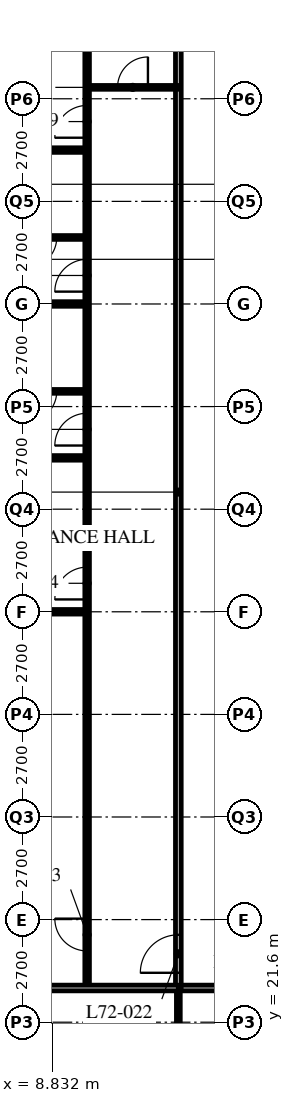
"""IFC4 building model, lengths in metres.
Left out: names, types, materials, properties, quantities, classifications, styles, units other than length and angle.
Written with IfcOpenShell. Run it as: python <this file> out.ifc"""

import sys

from ifc_helpers import new_model, si_unit, direction, frame, frame_2d, origin, place, context, subcontext, project, spatial, rectangle, extrude, element, fill, save


model = new_model("IFC4")
c1 = context("Model", 3, precision=1e-05, world=origin(), true_north=direction((0.0, 1.0)))
c2 = subcontext(c1, "Body", "Model", "MODEL_VIEW")
j1 = project(units=[si_unit("LENGTHUNIT", "METRE"), si_unit("PLANEANGLEUNIT", "RADIAN")], contexts=[c1])
p1 = place(None, origin())
s1 = spatial("IfcSite", under=j1, at=p1, CompositionType="ELEMENT")
p2 = place(p1, origin())
s2 = spatial("IfcBuilding", under=s1, at=p2, CompositionType="ELEMENT")
p3 = place(p2, frame((0.0, 0.0, 281.4)))
s3 = spatial("IfcBuildingStorey", under=s2, at=p3, CompositionType="ELEMENT", Elevation=281.4)
p4 = place(p3, frame((12.15, 22.5, 0.0), z_axis=(0.0, 0.0, 1.0), x_axis=(1.0, 0.0, 0.0)))
e1 = element("IfcWall", 1, at=p4, inside=s3, PredefinedType="PARTITIONING", context=c2, shape_type="SweptSolid", body=[
    extrude(rectangle(XDim=24.3, YDim=0.15, at=frame_2d((12.15, 0.0))), origin(), (0.0, 0.0, 1.0), 3.69),
])
p5 = place(p4, frame((4.45, 0.0, 0.0)))
e2 = element("IfcOpeningElement", 2, at=p5, cuts=e1, PredefinedType="OPENING", context=c2, shape_type="SweptSolid", body=[
    extrude(rectangle(XDim=1.0, YDim=2.1, at=frame_2d((0.5, 1.05))), frame((0.0, 0.085, 0.0), z_axis=(0.0, -1.0, 0.0), x_axis=(1.0, 0.0, 0.0)), (0.0, 0.0, 1.0), 0.17),
])
p6 = place(p4, frame((22.6, 0.0, 0.0)))
e3 = element("IfcOpeningElement", 3, at=p6, cuts=e1, PredefinedType="OPENING", context=c2, shape_type="SweptSolid", body=[
    extrude(rectangle(XDim=1.0, YDim=2.1, at=frame_2d((0.5, 1.05))), frame((0.0, 0.085, 0.0), z_axis=(0.0, -1.0, 0.0), x_axis=(1.0, 0.0, 0.0)), (0.0, 0.0, 1.0), 0.17),
])
p7 = place(p4, frame((2.625, 0.0, 0.0)))
e4 = element("IfcOpeningElement", 4, at=p7, cuts=e1, PredefinedType="OPENING", context=c2, shape_type="SweptSolid", body=[
    extrude(rectangle(XDim=1.0, YDim=2.1, at=frame_2d((0.5, 1.05))), frame((0.0, 0.085, 0.0), z_axis=(0.0, -1.0, 0.0), x_axis=(1.0, 0.0, 0.0)), (0.0, 0.0, 1.0), 0.17),
])
p8 = place(p3, frame((12.15, 22.5, 0.0), z_axis=(0.0, 0.0, 1.0), x_axis=(0.0, 1.0, 0.0)))
e5 = element("IfcWall", 5, at=p8, inside=s3, PredefinedType="PARTITIONING", context=c2, shape_type="SweptSolid", body=[
    extrude(rectangle(XDim=26.1, YDim=0.15, at=frame_2d((13.05, 0.0))), origin(), (0.0, 0.0, 1.0), 3.69),
])
p9 = place(p8, frame((0.4, 0.0, 0.0)))
e6 = element("IfcOpeningElement", 6, at=p9, cuts=e5, PredefinedType="OPENING", context=c2, shape_type="SweptSolid", body=[
    extrude(rectangle(XDim=1.0, YDim=2.1, at=frame_2d((0.5, 1.05))), frame((0.0, 0.085, 0.0), z_axis=(0.0, -1.0, 0.0), x_axis=(1.0, 0.0, 0.0)), (0.0, 0.0, 1.0), 0.17),
])
p10 = place(p3, frame((9.75, 22.5, 0.0), z_axis=(0.0, 0.0, 1.0), x_axis=(0.0, 1.0, 0.0)))
e7 = element("IfcWall", 7, at=p10, inside=s3, PredefinedType="PARTITIONING", context=c2, shape_type="SweptSolid", body=[
    extrude(rectangle(XDim=26.1, YDim=0.12, at=frame_2d((13.05, 0.0))), origin(), (0.0, 0.0, 1.0), 3.69),
])
p11 = place(p10, frame((0.975, 0.0, 0.0)))
e8 = element("IfcOpeningElement", 8, at=p11, cuts=e7, PredefinedType="OPENING", context=c2, shape_type="SweptSolid", body=[
    extrude(rectangle(XDim=0.85, YDim=2.1, at=frame_2d((0.425, 1.05))), frame((0.0, 0.07, 0.0), z_axis=(0.0, -1.0, 0.0), x_axis=(1.0, 0.0, 0.0)), (0.0, 0.0, 1.0), 0.14),
])
p12 = place(p10, frame((10.225, 0.0, 0.0)))
e9 = element("IfcOpeningElement", 9, at=p12, cuts=e7, PredefinedType="OPENING", context=c2, shape_type="SweptSolid", body=[
    extrude(rectangle(XDim=0.85, YDim=2.1, at=frame_2d((0.425, 1.05))), frame((0.0, 0.07, 0.0), z_axis=(0.0, -1.0, 0.0), x_axis=(1.0, 0.0, 0.0)), (0.0, 0.0, 1.0), 0.14),
])
p13 = place(p10, frame((14.275, 0.0, 0.0)))
e10 = element("IfcOpeningElement", 10, at=p13, cuts=e7, PredefinedType="OPENING", context=c2, shape_type="SweptSolid", body=[
    extrude(rectangle(XDim=0.85, YDim=2.1, at=frame_2d((0.425, 1.05))), frame((0.0, 0.07, 0.0), z_axis=(0.0, -1.0, 0.0), x_axis=(1.0, 0.0, 0.0)), (0.0, 0.0, 1.0), 0.14),
])
p14 = place(p10, frame((18.325, 0.0, 0.0)))
e11 = element("IfcOpeningElement", 11, at=p14, cuts=e7, PredefinedType="OPENING", context=c2, shape_type="SweptSolid", body=[
    extrude(rectangle(XDim=0.85, YDim=2.1, at=frame_2d((0.425, 1.05))), frame((0.0, 0.07, 0.0), z_axis=(0.0, -1.0, 0.0), x_axis=(1.0, 0.0, 0.0)), (0.0, 0.0, 1.0), 0.14),
])
p15 = place(p10, frame((22.375, 0.0, 0.0)))
e12 = element("IfcOpeningElement", 12, at=p15, cuts=e7, PredefinedType="OPENING", context=c2, shape_type="SweptSolid", body=[
    extrude(rectangle(XDim=0.85, YDim=2.1, at=frame_2d((0.425, 1.05))), frame((0.0, 0.07, 0.0), z_axis=(0.0, -1.0, 0.0), x_axis=(1.0, 0.0, 0.0)), (0.0, 0.0, 1.0), 0.14),
])
p16 = place(p3, frame((12.15, 46.2, 0.0), z_axis=(0.0, 0.0, 1.0), x_axis=(-1.0, 0.0, 0.0)))
e13 = element("IfcWall", 13, at=p16, inside=s3, PredefinedType="PARTITIONING", context=c2, shape_type="SweptSolid", body=[
    extrude(rectangle(XDim=2.4, YDim=0.1, at=frame_2d((1.2, 0.0))), origin(), (0.0, 0.0, 1.0), 3.69),
])
p17 = place(p16, frame((0.8, 0.0, 0.0)))
e14 = element("IfcOpeningElement", 14, at=p17, cuts=e13, PredefinedType="OPENING", context=c2, shape_type="SweptSolid", body=[
    extrude(rectangle(XDim=0.8, YDim=2.1, at=frame_2d((0.4, 1.05))), frame((0.0, 0.06, 0.0), z_axis=(0.0, -1.0, 0.0), x_axis=(1.0, 0.0, 0.0)), (0.0, 0.0, 1.0), 0.12),
])
p18 = place(p3, frame((9.75, 32.4, 0.0), z_axis=(0.0, 0.0, 1.0), x_axis=(-1.0, 0.0, 0.0)))
e15 = element("IfcWall", 15, at=p18, inside=s3, PredefinedType="PARTITIONING", context=c2, shape_type="SweptSolid", body=[
    extrude(rectangle(XDim=9.45, YDim=0.12, at=frame_2d((4.725, 0.0))), origin(), (0.0, 0.0, 1.0), 3.078),
])
p19 = place(p3, frame((9.75, 38.2, 0.0), z_axis=(0.0, 0.0, 1.0), x_axis=(-1.0, 0.0, 0.0)))
e16 = element("IfcWall", 16, at=p19, inside=s3, PredefinedType="PARTITIONING", context=c2, shape_type="SweptSolid", body=[
    extrude(rectangle(XDim=2.4, YDim=0.1, at=frame_2d((1.2, 0.0))), origin(), (0.0, 0.0, 1.0), 3.69),
])
p20 = place(p19, frame((0.8, 0.0, 0.0)))
e17 = element("IfcOpeningElement", 17, at=p20, cuts=e16, PredefinedType="OPENING", context=c2, shape_type="SweptSolid", body=[
    extrude(rectangle(XDim=0.8, YDim=2.1, at=frame_2d((0.4, 1.05))), frame((0.0, 0.06, 0.0), z_axis=(0.0, -1.0, 0.0), x_axis=(1.0, 0.0, 0.0)), (0.0, 0.0, 1.0), 0.12),
])
p21 = place(p3, frame((9.75, 36.45, 0.0), z_axis=(0.0, 0.0, 1.0), x_axis=(-1.0, 0.0, 0.0)))
e18 = element("IfcWall", 18, at=p21, inside=s3, PredefinedType="PARTITIONING", context=c2, shape_type="SweptSolid", body=[
    extrude(rectangle(XDim=9.45, YDim=0.12, at=frame_2d((4.725, 0.0))), origin(), (0.0, 0.0, 1.0), 3.69),
])
p22 = place(p3, frame((9.75, 42.25, 0.0), z_axis=(0.0, 0.0, 1.0), x_axis=(-1.0, 0.0, 0.0)))
e19 = element("IfcWall", 19, at=p22, inside=s3, PredefinedType="PARTITIONING", context=c2, shape_type="SweptSolid", body=[
    extrude(rectangle(XDim=2.4, YDim=0.1, at=frame_2d((1.2, 0.0))), origin(), (0.0, 0.0, 1.0), 3.69),
])
p23 = place(p22, frame((0.8, 0.0, 0.0)))
e20 = element("IfcOpeningElement", 20, at=p23, cuts=e19, PredefinedType="OPENING", context=c2, shape_type="SweptSolid", body=[
    extrude(rectangle(XDim=0.8, YDim=2.1, at=frame_2d((0.4, 1.05))), frame((0.0, 0.06, 0.0), z_axis=(0.0, -1.0, 0.0), x_axis=(1.0, 0.0, 0.0)), (0.0, 0.0, 1.0), 0.12),
])
p24 = place(p3, frame((9.75, 40.5, 0.0), z_axis=(0.0, 0.0, 1.0), x_axis=(-1.0, 0.0, 0.0)))
e21 = element("IfcWall", 21, at=p24, inside=s3, PredefinedType="PARTITIONING", context=c2, shape_type="SweptSolid", body=[
    extrude(rectangle(XDim=9.45, YDim=0.12, at=frame_2d((4.725, 0.0))), origin(), (0.0, 0.0, 1.0), 3.078),
])
p25 = place(p3, frame((9.75, 44.55, 0.0), z_axis=(0.0, 0.0, 1.0), x_axis=(-1.0, 0.0, 0.0)))
e22 = element("IfcWall", 22, at=p25, inside=s3, PredefinedType="PARTITIONING", context=c2, shape_type="SweptSolid", body=[
    extrude(rectangle(XDim=9.45, YDim=0.12, at=frame_2d((4.725, 0.0))), origin(), (0.0, 0.0, 1.0), 3.69),
])
p26 = place(p3, frame((12.15, 22.5, 0.0), z_axis=(0.0, 0.0, 1.0), x_axis=(0.0, -1.0, 0.0)))
e23 = element("IfcWall", 23, at=p26, inside=s3, PredefinedType="PARTITIONING", context=c2, shape_type="SweptSolid", body=[
    extrude(rectangle(XDim=2.4, YDim=0.1, at=frame_2d((1.2, 0.0))), origin(), (0.0, 0.0, 1.0), 3.69),
])
p27 = place(p3, frame((4.35, 22.5, 0.0), z_axis=(0.0, 0.0, 1.0), x_axis=(1.0, 0.0, 0.0)))
e24 = element("IfcWall", 24, at=p27, inside=s3, PredefinedType="PARTITIONING", context=c2, shape_type="SweptSolid", body=[
    extrude(rectangle(XDim=7.8, YDim=0.15, at=frame_2d((3.9, 0.0))), origin(), (0.0, 0.0, 1.0), 3.69),
])
p28 = place(p17, origin())
e25 = element("IfcDoor", 25, at=p28, inside=s3, OperationType="SINGLE_SWING_RIGHT", PredefinedType="DOOR", context=c2, shape_type="SweptSolid", body=[
    extrude(rectangle(XDim=0.8, YDim=2.1, at=frame_2d((0.4, 1.05))), frame((0.0, 0.025, 0.0), z_axis=(0.0, -1.0, 0.0), x_axis=(1.0, 0.0, 0.0)), (0.0, 0.0, 1.0), 0.05),
])
fill(e14, e25)
p29 = place(p9, origin())
e26 = element("IfcDoor", 26, at=p29, inside=s3, OperationType="SINGLE_SWING_LEFT", PredefinedType="DOOR", context=c2, shape_type="SweptSolid", body=[
    extrude(rectangle(XDim=1.0, YDim=2.1, at=frame_2d((0.5, 1.05))), frame((0.0, 0.025, 0.0), z_axis=(0.0, -1.0, 0.0), x_axis=(1.0, 0.0, 0.0)), (0.0, 0.0, 1.0), 0.05),
])
fill(e6, e26)
p30 = place(p11, origin())
e27 = element("IfcDoor", 27, at=p30, inside=s3, OperationType="SINGLE_SWING_RIGHT", PredefinedType="DOOR", context=c2, shape_type="SweptSolid", body=[
    extrude(rectangle(XDim=0.85, YDim=2.1, at=frame_2d((0.425, 1.05))), frame((0.0, 0.025, 0.0), z_axis=(0.0, -1.0, 0.0), x_axis=(1.0, 0.0, 0.0)), (0.0, 0.0, 1.0), 0.05),
])
fill(e8, e27)
p31 = place(p12, origin())
e28 = element("IfcDoor", 28, at=p31, inside=s3, OperationType="SINGLE_SWING_LEFT", PredefinedType="DOOR", context=c2, shape_type="SweptSolid", body=[
    extrude(rectangle(XDim=0.85, YDim=2.1, at=frame_2d((0.425, 1.05))), frame((0.0, 0.025, 0.0), z_axis=(0.0, -1.0, 0.0), x_axis=(1.0, 0.0, 0.0)), (0.0, 0.0, 1.0), 0.05),
])
fill(e9, e28)
p32 = place(p20, origin())
e29 = element("IfcDoor", 29, at=p32, inside=s3, OperationType="SINGLE_SWING_RIGHT", PredefinedType="DOOR", context=c2, shape_type="SweptSolid", body=[
    extrude(rectangle(XDim=0.8, YDim=2.1, at=frame_2d((0.4, 1.05))), frame((0.0, 0.025, 0.0), z_axis=(0.0, -1.0, 0.0), x_axis=(1.0, 0.0, 0.0)), (0.0, 0.0, 1.0), 0.05),
])
fill(e17, e29)
p33 = place(p13, origin())
e30 = element("IfcDoor", 30, at=p33, inside=s3, OperationType="SINGLE_SWING_LEFT", PredefinedType="DOOR", context=c2, shape_type="SweptSolid", body=[
    extrude(rectangle(XDim=0.85, YDim=2.1, at=frame_2d((0.425, 1.05))), frame((0.0, 0.025, 0.0), z_axis=(0.0, -1.0, 0.0), x_axis=(1.0, 0.0, 0.0)), (0.0, 0.0, 1.0), 0.05),
])
fill(e10, e30)
p34 = place(p23, origin())
e31 = element("IfcDoor", 31, at=p34, inside=s3, OperationType="SINGLE_SWING_RIGHT", PredefinedType="DOOR", context=c2, shape_type="SweptSolid", body=[
    extrude(rectangle(XDim=0.8, YDim=2.1, at=frame_2d((0.4, 1.05))), frame((0.0, 0.025, 0.0), z_axis=(0.0, -1.0, 0.0), x_axis=(1.0, 0.0, 0.0)), (0.0, 0.0, 1.0), 0.05),
])
fill(e20, e31)
p35 = place(p14, origin())
e32 = element("IfcDoor", 32, at=p35, inside=s3, OperationType="SINGLE_SWING_LEFT", PredefinedType="DOOR", context=c2, shape_type="SweptSolid", body=[
    extrude(rectangle(XDim=0.85, YDim=2.1, at=frame_2d((0.425, 1.05))), frame((0.0, 0.025, 0.0), z_axis=(0.0, -1.0, 0.0), x_axis=(1.0, 0.0, 0.0)), (0.0, 0.0, 1.0), 0.05),
])
fill(e11, e32)
p36 = place(p15, origin())
e33 = element("IfcDoor", 33, at=p36, inside=s3, OperationType="SINGLE_SWING_LEFT", PredefinedType="DOOR", context=c2, shape_type="SweptSolid", body=[
    extrude(rectangle(XDim=0.85, YDim=2.1, at=frame_2d((0.425, 1.05))), frame((0.0, 0.025, 0.0), z_axis=(0.0, -1.0, 0.0), x_axis=(1.0, 0.0, 0.0)), (0.0, 0.0, 1.0), 0.05),
])
fill(e12, e33)
save(model, sys.argv[1])
